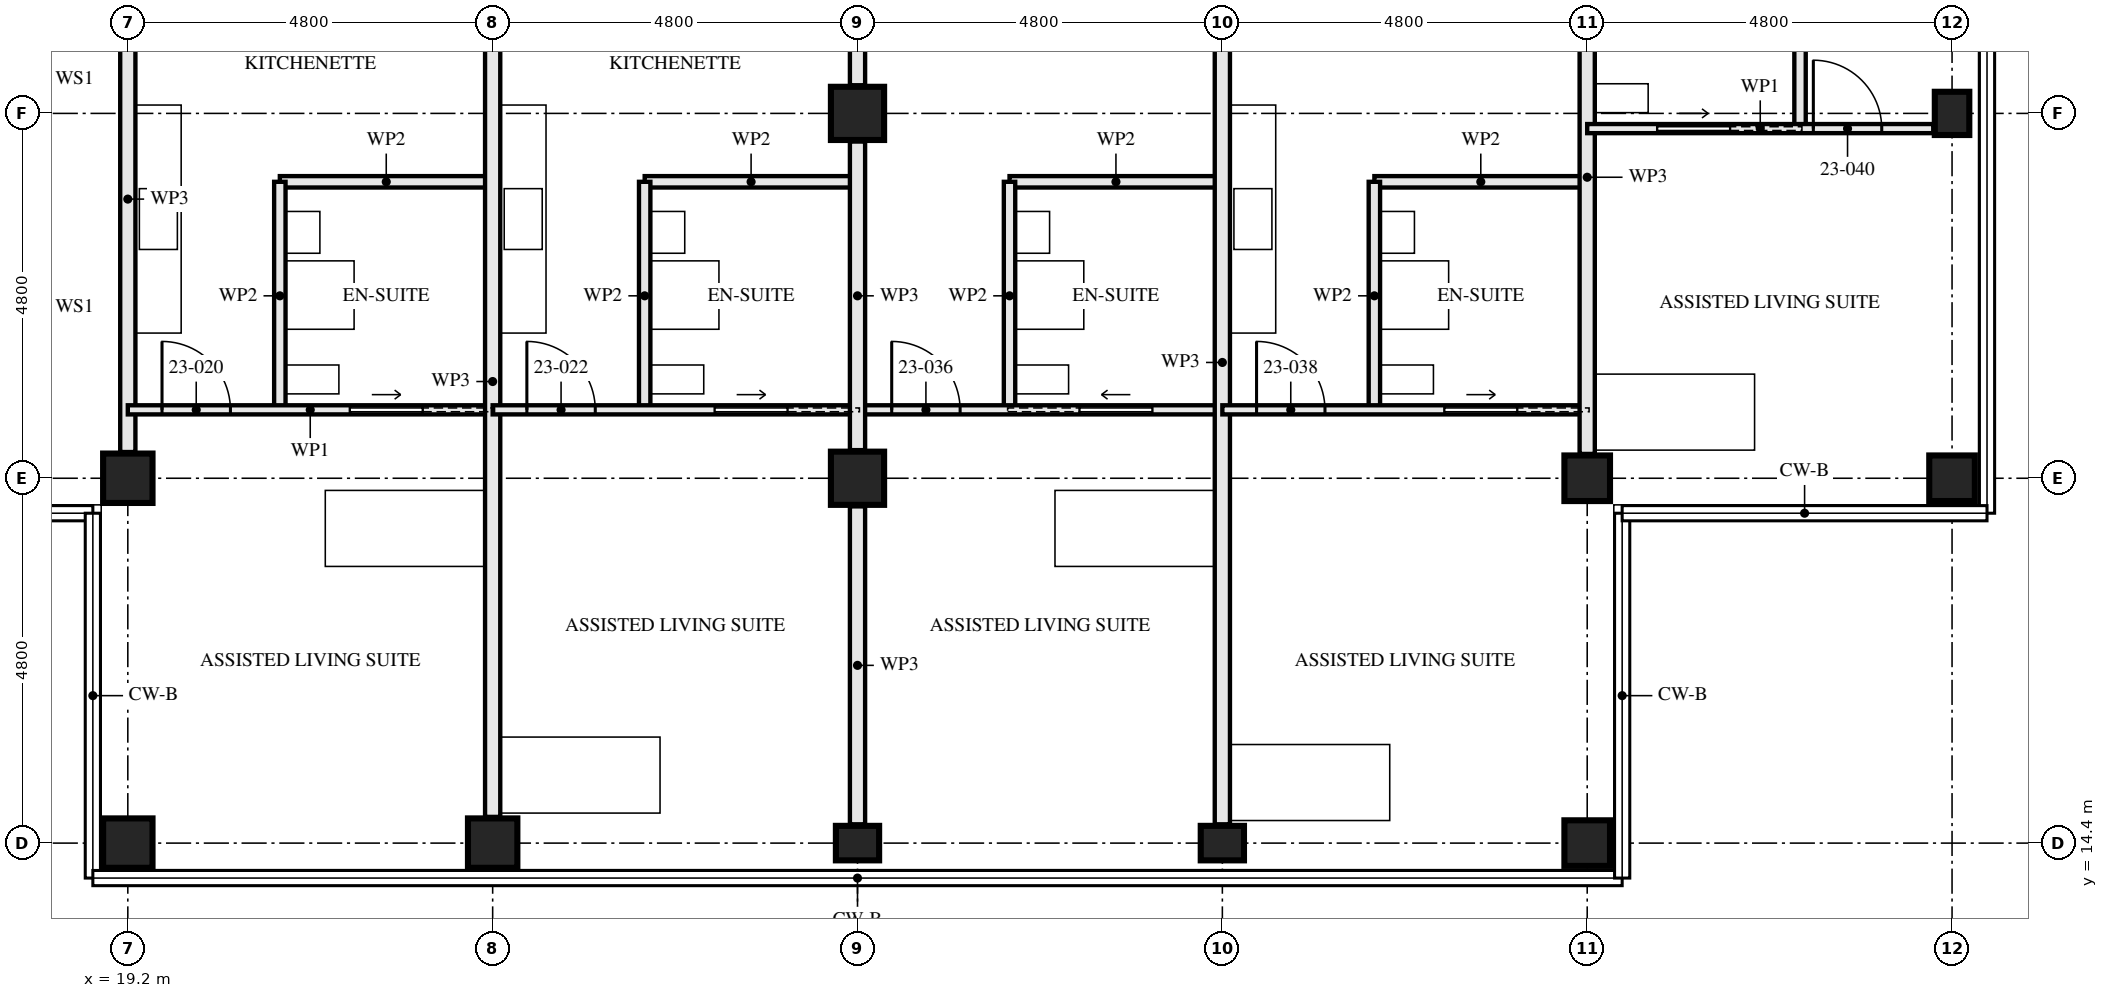
"""IFC4 building model, lengths in metres.
Left out: names, types, materials, properties, quantities, classifications, styles, units other than length and angle.
Written with IfcOpenShell. Run it as: python <this file> out.ifc"""

import sys

from ifc_helpers import new_model, si_unit, direction, frame, frame_2d, origin, origin_2d, place, context, subcontext, project, spatial, rectangle, hollow_rectangle, i_section, extrude, element, fill, save


model = new_model("IFC4")
c1 = context("Model", 3, precision=1e-05, world=origin(), true_north=direction((0.0, 1.0)))
c2 = subcontext(c1, "Body", "Model", "MODEL_VIEW")
j1 = project(units=[si_unit("LENGTHUNIT", "METRE"), si_unit("PLANEANGLEUNIT", "RADIAN")], contexts=[c1])
p1 = place(None, origin())
s1 = spatial("IfcSite", under=j1, at=p1, CompositionType="ELEMENT")
p2 = place(p1, origin())
s2 = spatial("IfcBuilding", under=s1, at=p2, CompositionType="ELEMENT")
p3 = place(p2, frame((0.0, 0.0, 87.5)))
s3 = spatial("IfcBuildingStorey", under=s2, at=p3, CompositionType="ELEMENT", Elevation=87.5)
for number, where, z_axis, x_axis in (
    (1, (19.2, 14.4, 0.0), (0.0, 0.0, 1.0), (0.0, 1.0, 0.0)),
    (2, (19.2, 19.2, 0.0), (0.0, 0.0, 1.0), (0.0, 1.0, 0.0)),
    (3, (24.0, 14.4, 0.0), (0.0, 0.0, 1.0), (0.0, 1.0, 0.0)),
):
    element("IfcColumn", number, at=place(p3, frame(where, z_axis=z_axis, x_axis=x_axis)), inside=s3, PredefinedType="COLUMN", context=c2, shape_type="SweptSolid", body=[
        extrude(hollow_rectangle(XDim=0.65, YDim=0.65, WallThickness=0.08, at=origin_2d()), origin(), (0.0, 0.0, 1.0), 3.5),
    ])
p4 = place(p3, frame((28.8, 14.4, 0.0), z_axis=(0.0, 0.0, 1.0), x_axis=(0.0, 1.0, 0.0)))
e4 = element("IfcColumn", 4, at=p4, inside=s3, PredefinedType="COLUMN", context=c2, shape_type="SweptSolid", body=[
    extrude(i_section(OverallWidth=0.454, OverallDepth=0.569, WebThickness=0.078, FlangeThickness=0.125, FilletRadius=0.015, at=origin_2d()), origin(), (0.0, 0.0, 1.0), 3.5),
])
for number, where, z_axis, x_axis in (
    (5, (28.8, 19.2, 0.0), (0.0, 0.0, 1.0), (1.0, 0.0, 0.0)),
    (6, (28.8, 24.0, 0.0), (0.0, 0.0, 1.0), (1.0, 0.0, 0.0)),
):
    element("IfcColumn", number, at=place(p3, frame(where, z_axis=z_axis, x_axis=x_axis)), inside=s3, PredefinedType="COLUMN", context=c2, shape_type="SweptSolid", body=[
        extrude(hollow_rectangle(XDim=0.7, YDim=0.7, WallThickness=0.06, at=origin_2d()), origin(), (0.0, 0.0, 1.0), 3.5),
    ])
p5 = place(p3, frame((33.6, 14.4, 0.0), z_axis=(0.0, 0.0, 1.0), x_axis=(0.0, 1.0, 0.0)))
e7 = element("IfcColumn", 7, at=p5, inside=s3, PredefinedType="COLUMN", context=c2, shape_type="SweptSolid", body=[
    extrude(i_section(OverallWidth=0.454, OverallDepth=0.569, WebThickness=0.078, FlangeThickness=0.125, FilletRadius=0.015, at=origin_2d()), origin(), (0.0, 0.0, 1.0), 3.5),
])
for number, where, z_axis, x_axis in (
    (8, (38.4, 14.4, 0.0), (0.0, 0.0, 1.0), (0.0, 1.0, 0.0)),
    (9, (38.4, 19.2, 0.0), (0.0, 0.0, 1.0), (0.0, 1.0, 0.0)),
    (10, (43.2, 19.2, 0.0), (0.0, 0.0, 1.0), (0.0, 1.0, 0.0)),
):
    element("IfcColumn", number, at=place(p3, frame(where, z_axis=z_axis, x_axis=x_axis)), inside=s3, PredefinedType="COLUMN", context=c2, shape_type="SweptSolid", body=[
        extrude(hollow_rectangle(XDim=0.6, YDim=0.6, WallThickness=0.05, at=origin_2d()), origin(), (0.0, 0.0, 1.0), 3.5),
    ])
p6 = place(p3, frame((43.2, 24.0, 0.0), z_axis=(0.0, 0.0, 1.0), x_axis=(1.0, 0.0, 0.0)))
e11 = element("IfcColumn", 11, at=p6, inside=s3, PredefinedType="COLUMN", context=c2, shape_type="SweptSolid", body=[
    extrude(i_section(OverallWidth=0.454, OverallDepth=0.569, WebThickness=0.078, FlangeThickness=0.125, FilletRadius=0.015, at=origin_2d()), origin(), (0.0, 0.0, 1.0), 3.5),
])
p7 = place(p3, frame((19.2, 19.545, 0.0), z_axis=(0.0, 0.0, 1.0), x_axis=(0.0, 1.0, 0.0)))
e12 = element("IfcWall", 12, at=p7, inside=s3, PredefinedType="PARTITIONING", context=c2, shape_type="SweptSolid", body=[
    extrude(rectangle(XDim=6.655, YDim=0.2, at=frame_2d((3.328, 0.0))), origin(), (0.0, 0.0, 1.0), 2.55),
])
p8 = place(p3, frame((21.2, 20.1, 0.0), z_axis=(0.0, 0.0, 1.0), x_axis=(0.0, 1.0, 0.0)))
e13 = element("IfcWall", 13, at=p8, inside=s3, PredefinedType="PARTITIONING", context=c2, shape_type="SweptSolid", body=[
    extrude(rectangle(XDim=3.0, YDim=0.15, at=frame_2d((1.5, 0.0))), origin(), (0.0, 0.0, 1.0), 3.33),
])
p9 = place(p3, frame((21.2, 23.1, 0.0), z_axis=(0.0, 0.0, 1.0), x_axis=(1.0, 0.0, 0.0)))
e14 = element("IfcWall", 14, at=p9, inside=s3, PredefinedType="PARTITIONING", context=c2, shape_type="SweptSolid", body=[
    extrude(rectangle(XDim=2.8, YDim=0.15, at=frame_2d((1.4, 0.0))), origin(), (0.0, 0.0, 1.0), 3.33),
])
p10 = place(p3, frame((19.2, 20.1, 0.0), z_axis=(0.0, 0.0, 1.0), x_axis=(1.0, 0.0, 0.0)))
e15 = element("IfcWall", 15, at=p10, inside=s3, PredefinedType="PARTITIONING", context=c2, shape_type="SweptSolid", body=[
    extrude(rectangle(XDim=4.8, YDim=0.12, at=frame_2d((2.4, 0.0))), origin(), (0.0, 0.0, 1.0), 3.33),
])
p11 = place(p10, frame((0.45, 0.0, 0.0)))
e16 = element("IfcOpeningElement", 16, at=p11, cuts=e15, PredefinedType="OPENING", context=c2, shape_type="SweptSolid", body=[
    extrude(rectangle(XDim=0.9, YDim=2.1, at=frame_2d((0.45, 1.05))), frame((0.0, 0.071, 0.0), z_axis=(0.0, -1.0, 0.0), x_axis=(1.0, 0.0, 0.0)), (0.0, 0.0, 1.0), 0.141),
])
p12 = place(p10, frame((2.925, 0.0, 0.0)))
e17 = element("IfcOpeningElement", 17, at=p12, cuts=e15, PredefinedType="OPENING", context=c2, shape_type="SweptSolid", body=[
    extrude(rectangle(XDim=0.95, YDim=2.1, at=frame_2d((0.475, 1.05))), frame((0.0, 0.071, 0.0), z_axis=(0.0, -1.0, 0.0), x_axis=(1.0, 0.0, 0.0)), (0.0, 0.0, 1.0), 0.141),
])
p13 = place(p3, frame((24.0, 14.745, 0.0), z_axis=(0.0, 0.0, 1.0), x_axis=(0.0, 1.0, 0.0)))
e18 = element("IfcWall", 18, at=p13, inside=s3, PredefinedType="PARTITIONING", context=c2, shape_type="SweptSolid", body=[
    extrude(rectangle(XDim=11.455, YDim=0.2, at=frame_2d((5.728, 0.0))), origin(), (0.0, 0.0, 1.0), 2.55),
])
p14 = place(p3, frame((26.0, 20.1, 0.0), z_axis=(0.0, 0.0, 1.0), x_axis=(0.0, 1.0, 0.0)))
e19 = element("IfcWall", 19, at=p14, inside=s3, PredefinedType="PARTITIONING", context=c2, shape_type="SweptSolid", body=[
    extrude(rectangle(XDim=3.0, YDim=0.15, at=frame_2d((1.5, 0.0))), origin(), (0.0, 0.0, 1.0), 3.33),
])
p15 = place(p3, frame((26.0, 23.1, 0.0), z_axis=(0.0, 0.0, 1.0), x_axis=(1.0, 0.0, 0.0)))
e20 = element("IfcWall", 20, at=p15, inside=s3, PredefinedType="PARTITIONING", context=c2, shape_type="SweptSolid", body=[
    extrude(rectangle(XDim=2.8, YDim=0.15, at=frame_2d((1.4, 0.0))), origin(), (0.0, 0.0, 1.0), 3.33),
])
p16 = place(p3, frame((24.0, 20.1, 0.0), z_axis=(0.0, 0.0, 1.0), x_axis=(1.0, 0.0, 0.0)))
e21 = element("IfcWall", 21, at=p16, inside=s3, PredefinedType="PARTITIONING", context=c2, shape_type="SweptSolid", body=[
    extrude(rectangle(XDim=4.8, YDim=0.12, at=frame_2d((2.4, 0.0))), origin(), (0.0, 0.0, 1.0), 3.33),
])
p17 = place(p16, frame((0.45, 0.0, 0.0)))
e22 = element("IfcOpeningElement", 22, at=p17, cuts=e21, PredefinedType="OPENING", context=c2, shape_type="SweptSolid", body=[
    extrude(rectangle(XDim=0.9, YDim=2.1, at=frame_2d((0.45, 1.05))), frame((0.0, 0.071, 0.0), z_axis=(0.0, -1.0, 0.0), x_axis=(1.0, 0.0, 0.0)), (0.0, 0.0, 1.0), 0.141),
])
p18 = place(p16, frame((2.925, 0.0, 0.0)))
e23 = element("IfcOpeningElement", 23, at=p18, cuts=e21, PredefinedType="OPENING", context=c2, shape_type="SweptSolid", body=[
    extrude(rectangle(XDim=0.95, YDim=2.1, at=frame_2d((0.475, 1.05))), frame((0.0, 0.071, 0.0), z_axis=(0.0, -1.0, 0.0), x_axis=(1.0, 0.0, 0.0)), (0.0, 0.0, 1.0), 0.141),
])
p19 = place(p3, frame((30.8, 20.1, 0.0), z_axis=(0.0, 0.0, 1.0), x_axis=(0.0, 1.0, 0.0)))
e24 = element("IfcWall", 24, at=p19, inside=s3, PredefinedType="PARTITIONING", context=c2, shape_type="SweptSolid", body=[
    extrude(rectangle(XDim=3.0, YDim=0.15, at=frame_2d((1.5, 0.0))), origin(), (0.0, 0.0, 1.0), 3.33),
])
p20 = place(p3, frame((30.8, 23.1, 0.0), z_axis=(0.0, 0.0, 1.0), x_axis=(1.0, 0.0, 0.0)))
e25 = element("IfcWall", 25, at=p20, inside=s3, PredefinedType="PARTITIONING", context=c2, shape_type="SweptSolid", body=[
    extrude(rectangle(XDim=2.8, YDim=0.15, at=frame_2d((1.4, 0.0))), origin(), (0.0, 0.0, 1.0), 3.33),
])
p21 = place(p3, frame((28.8, 20.1, 0.0), z_axis=(0.0, 0.0, 1.0), x_axis=(1.0, 0.0, 0.0)))
e26 = element("IfcWall", 26, at=p21, inside=s3, PredefinedType="PARTITIONING", context=c2, shape_type="SweptSolid", body=[
    extrude(rectangle(XDim=4.8, YDim=0.12, at=frame_2d((2.4, 0.0))), origin(), (0.0, 0.0, 1.0), 3.33),
])
p22 = place(p21, frame((0.45, 0.0, 0.0)))
e27 = element("IfcOpeningElement", 27, at=p22, cuts=e26, PredefinedType="OPENING", context=c2, shape_type="SweptSolid", body=[
    extrude(rectangle(XDim=0.9, YDim=2.1, at=frame_2d((0.45, 1.05))), frame((0.0, 0.071, 0.0), z_axis=(0.0, -1.0, 0.0), x_axis=(1.0, 0.0, 0.0)), (0.0, 0.0, 1.0), 0.141),
])
p23 = place(p21, frame((2.925, 0.0, 0.0)))
e28 = element("IfcOpeningElement", 28, at=p23, cuts=e26, PredefinedType="OPENING", context=c2, shape_type="SweptSolid", body=[
    extrude(rectangle(XDim=0.95, YDim=2.1, at=frame_2d((0.475, 1.05))), frame((0.0, 0.071, 0.0), z_axis=(0.0, -1.0, 0.0), x_axis=(1.0, 0.0, 0.0)), (0.0, 0.0, 1.0), 0.141),
])
p24 = place(p3, frame((33.6, 14.647, 0.0), z_axis=(0.0, 0.0, 1.0), x_axis=(0.0, 1.0, 0.0)))
e29 = element("IfcWall", 29, at=p24, inside=s3, PredefinedType="PARTITIONING", context=c2, shape_type="SweptSolid", body=[
    extrude(rectangle(XDim=12.153, YDim=0.2, at=frame_2d((6.077, 0.0))), origin(), (0.0, 0.0, 1.0), 2.55),
])
p25 = place(p3, frame((35.6, 20.1, 0.0), z_axis=(0.0, 0.0, 1.0), x_axis=(0.0, 1.0, 0.0)))
e30 = element("IfcWall", 30, at=p25, inside=s3, PredefinedType="PARTITIONING", context=c2, shape_type="SweptSolid", body=[
    extrude(rectangle(XDim=3.0, YDim=0.15, at=frame_2d((1.5, 0.0))), origin(), (0.0, 0.0, 1.0), 3.33),
])
p26 = place(p3, frame((35.6, 23.1, 0.0), z_axis=(0.0, 0.0, 1.0), x_axis=(1.0, 0.0, 0.0)))
e31 = element("IfcWall", 31, at=p26, inside=s3, PredefinedType="PARTITIONING", context=c2, shape_type="SweptSolid", body=[
    extrude(rectangle(XDim=2.8, YDim=0.15, at=frame_2d((1.4, 0.0))), origin(), (0.0, 0.0, 1.0), 3.33),
])
p27 = place(p3, frame((33.6, 20.1, 0.0), z_axis=(0.0, 0.0, 1.0), x_axis=(1.0, 0.0, 0.0)))
e32 = element("IfcWall", 32, at=p27, inside=s3, PredefinedType="PARTITIONING", context=c2, shape_type="SweptSolid", body=[
    extrude(rectangle(XDim=4.8, YDim=0.12, at=frame_2d((2.4, 0.0))), origin(), (0.0, 0.0, 1.0), 3.33),
])
p28 = place(p27, frame((0.45, 0.0, 0.0)))
e33 = element("IfcOpeningElement", 33, at=p28, cuts=e32, PredefinedType="OPENING", context=c2, shape_type="SweptSolid", body=[
    extrude(rectangle(XDim=0.9, YDim=2.1, at=frame_2d((0.45, 1.05))), frame((0.0, 0.071, 0.0), z_axis=(0.0, -1.0, 0.0), x_axis=(1.0, 0.0, 0.0)), (0.0, 0.0, 1.0), 0.141),
])
p29 = place(p27, frame((2.925, 0.0, 0.0)))
e34 = element("IfcOpeningElement", 34, at=p29, cuts=e32, PredefinedType="OPENING", context=c2, shape_type="SweptSolid", body=[
    extrude(rectangle(XDim=0.95, YDim=2.1, at=frame_2d((0.475, 1.05))), frame((0.0, 0.071, 0.0), z_axis=(0.0, -1.0, 0.0), x_axis=(1.0, 0.0, 0.0)), (0.0, 0.0, 1.0), 0.141),
])
p30 = place(p3, frame((38.4, 19.52, 0.0), z_axis=(0.0, 0.0, 1.0), x_axis=(0.0, 1.0, 0.0)))
e35 = element("IfcWall", 35, at=p30, inside=s3, PredefinedType="PARTITIONING", context=c2, shape_type="SweptSolid", body=[
    extrude(rectangle(XDim=7.28, YDim=0.2, at=frame_2d((3.64, 0.0))), origin(), (0.0, 0.0, 1.0), 2.55),
])
p31 = place(p3, frame((41.2, 23.8, 0.0), z_axis=(0.0, 0.0, 1.0), x_axis=(0.0, 1.0, 0.0)))
e36 = element("IfcWall", 36, at=p31, inside=s3, PredefinedType="PARTITIONING", context=c2, shape_type="SweptSolid", body=[
    extrude(rectangle(XDim=3.0, YDim=0.15, at=frame_2d((1.5, 0.0))), origin(), (0.0, 0.0, 1.0), 2.55),
])
p32 = place(p3, frame((38.4, 23.8, 0.0), z_axis=(0.0, 0.0, 1.0), x_axis=(1.0, 0.0, 0.0)))
e37 = element("IfcWall", 37, at=p32, inside=s3, PredefinedType="PARTITIONING", context=c2, shape_type="SweptSolid", body=[
    extrude(rectangle(XDim=4.553, YDim=0.12, at=frame_2d((2.276, 0.0))), origin(), (0.0, 0.0, 1.0), 3.33),
])
p33 = place(p32, frame((2.975, 0.0, 0.0)))
e38 = element("IfcOpeningElement", 38, at=p33, cuts=e37, PredefinedType="OPENING", context=c2, shape_type="SweptSolid", body=[
    extrude(rectangle(XDim=0.9, YDim=2.1, at=frame_2d((0.45, 1.05))), frame((0.0, 0.071, 0.0), z_axis=(0.0, -1.0, 0.0), x_axis=(1.0, 0.0, 0.0)), (0.0, 0.0, 1.0), 0.141),
])
p34 = place(p32, frame((0.925, 0.0, 0.0)))
e39 = element("IfcOpeningElement", 39, at=p34, cuts=e37, PredefinedType="OPENING", context=c2, shape_type="SweptSolid", body=[
    extrude(rectangle(XDim=0.95, YDim=2.1, at=frame_2d((0.475, 1.05))), frame((0.0, 0.071, 0.0), z_axis=(0.0, -1.0, 0.0), x_axis=(1.0, 0.0, 0.0)), (0.0, 0.0, 1.0), 0.141),
])
p35 = place(p3, frame((28.8, 14.647, 0.0), z_axis=(0.0, 0.0, 1.0), x_axis=(0.0, 1.0, 0.0)))
e40 = element("IfcWall", 40, at=p35, inside=s3, PredefinedType="PARTITIONING", context=c2, shape_type="SweptSolid", body=[
    extrude(rectangle(XDim=4.183, YDim=0.2, at=frame_2d((2.092, 0.0))), origin(), (0.0, 0.0, 1.0), 2.32),
])
p36 = place(p3, frame((28.8, 19.57, 0.0), z_axis=(0.0, 0.0, 1.0), x_axis=(0.0, 1.0, 0.0)))
e41 = element("IfcWall", 41, at=p36, inside=s3, PredefinedType="PARTITIONING", context=c2, shape_type="SweptSolid", body=[
    extrude(rectangle(XDim=4.06, YDim=0.2, at=frame_2d((2.03, 0.0))), origin(), (0.0, 0.0, 1.0), 2.32),
])
p37 = place(p3, frame((28.8, 24.37, 0.0), z_axis=(0.0, 0.0, 1.0), x_axis=(0.0, 1.0, 0.0)))
e42 = element("IfcWall", 42, at=p37, inside=s3, PredefinedType="PARTITIONING", context=c2, shape_type="SweptSolid", body=[
    extrude(rectangle(XDim=2.53, YDim=0.2, at=frame_2d((1.265, 0.0))), origin(), (0.0, 0.0, 1.0), 2.32),
])
p38 = place(p11, origin())
e43 = element("IfcDoor", 43, at=p38, inside=s3, OperationType="SINGLE_SWING_RIGHT", PredefinedType="DOOR", context=c2, shape_type="SweptSolid", body=[
    extrude(rectangle(XDim=0.9, YDim=2.1, at=frame_2d((0.45, 1.05))), frame((0.0, 0.022, 0.0), z_axis=(0.0, -1.0, 0.0), x_axis=(1.0, 0.0, 0.0)), (0.0, 0.0, 1.0), 0.044),
])
fill(e16, e43)
p39 = place(p12, origin())
e44 = element("IfcDoor", 44, at=p39, inside=s3, OperationType="SLIDING_TO_LEFT", PredefinedType="DOOR", context=c2, shape_type="SweptSolid", body=[
    extrude(rectangle(XDim=0.95, YDim=2.1, at=frame_2d((0.475, 1.05))), frame((0.0, 0.022, 0.0), z_axis=(0.0, -1.0, 0.0), x_axis=(1.0, 0.0, 0.0)), (0.0, 0.0, 1.0), 0.044),
])
fill(e17, e44)
p40 = place(p17, origin())
e45 = element("IfcDoor", 45, at=p40, inside=s3, OperationType="SINGLE_SWING_RIGHT", PredefinedType="DOOR", context=c2, shape_type="SweptSolid", body=[
    extrude(rectangle(XDim=0.9, YDim=2.1, at=frame_2d((0.45, 1.05))), frame((0.0, 0.022, 0.0), z_axis=(0.0, -1.0, 0.0), x_axis=(1.0, 0.0, 0.0)), (0.0, 0.0, 1.0), 0.044),
])
fill(e22, e45)
p41 = place(p18, origin())
e46 = element("IfcDoor", 46, at=p41, inside=s3, OperationType="SLIDING_TO_LEFT", PredefinedType="DOOR", context=c2, shape_type="SweptSolid", body=[
    extrude(rectangle(XDim=0.95, YDim=2.1, at=frame_2d((0.475, 1.05))), frame((0.0, 0.022, 0.0), z_axis=(0.0, -1.0, 0.0), x_axis=(1.0, 0.0, 0.0)), (0.0, 0.0, 1.0), 0.044),
])
fill(e23, e46)
p42 = place(p22, origin())
e47 = element("IfcDoor", 47, at=p42, inside=s3, OperationType="SINGLE_SWING_RIGHT", PredefinedType="DOOR", context=c2, shape_type="SweptSolid", body=[
    extrude(rectangle(XDim=0.9, YDim=2.1, at=frame_2d((0.45, 1.05))), frame((0.0, 0.022, 0.0), z_axis=(0.0, -1.0, 0.0), x_axis=(1.0, 0.0, 0.0)), (0.0, 0.0, 1.0), 0.044),
])
fill(e27, e47)
p43 = place(p23, origin())
e48 = element("IfcDoor", 48, at=p43, inside=s3, OperationType="SLIDING_TO_RIGHT", PredefinedType="DOOR", context=c2, shape_type="SweptSolid", body=[
    extrude(rectangle(XDim=0.95, YDim=2.1, at=frame_2d((0.475, 1.05))), frame((0.0, 0.022, 0.0), z_axis=(0.0, -1.0, 0.0), x_axis=(1.0, 0.0, 0.0)), (0.0, 0.0, 1.0), 0.044),
])
fill(e28, e48)
p44 = place(p28, origin())
e49 = element("IfcDoor", 49, at=p44, inside=s3, OperationType="SINGLE_SWING_RIGHT", PredefinedType="DOOR", context=c2, shape_type="SweptSolid", body=[
    extrude(rectangle(XDim=0.9, YDim=2.1, at=frame_2d((0.45, 1.05))), frame((0.0, 0.022, 0.0), z_axis=(0.0, -1.0, 0.0), x_axis=(1.0, 0.0, 0.0)), (0.0, 0.0, 1.0), 0.044),
])
fill(e33, e49)
p45 = place(p29, origin())
e50 = element("IfcDoor", 50, at=p45, inside=s3, OperationType="SLIDING_TO_LEFT", PredefinedType="DOOR", context=c2, shape_type="SweptSolid", body=[
    extrude(rectangle(XDim=0.95, YDim=2.1, at=frame_2d((0.475, 1.05))), frame((0.0, 0.022, 0.0), z_axis=(0.0, -1.0, 0.0), x_axis=(1.0, 0.0, 0.0)), (0.0, 0.0, 1.0), 0.044),
])
fill(e34, e50)
p46 = place(p33, origin())
e51 = element("IfcDoor", 51, at=p46, inside=s3, OperationType="SINGLE_SWING_RIGHT", PredefinedType="DOOR", context=c2, shape_type="SweptSolid", body=[
    extrude(rectangle(XDim=0.9, YDim=2.1, at=frame_2d((0.45, 1.05))), frame((0.0, 0.022, 0.0), z_axis=(0.0, -1.0, 0.0), x_axis=(1.0, 0.0, 0.0)), (0.0, 0.0, 1.0), 0.044),
])
fill(e38, e51)
p47 = place(p34, origin())
e52 = element("IfcDoor", 52, at=p47, inside=s3, OperationType="SLIDING_TO_LEFT", PredefinedType="DOOR", context=c2, shape_type="SweptSolid", body=[
    extrude(rectangle(XDim=0.95, YDim=2.1, at=frame_2d((0.475, 1.05))), frame((0.0, 0.022, 0.0), z_axis=(0.0, -1.0, 0.0), x_axis=(1.0, 0.0, 0.0)), (0.0, 0.0, 1.0), 0.044),
])
fill(e39, e52)
save(model, sys.argv[1])
